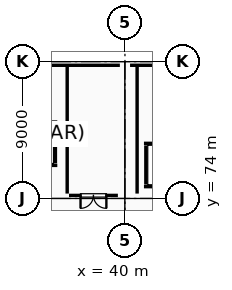
"""IFC4 building model, lengths in metres.
Left out: names, types, materials, properties, quantities, classifications, styles, units other than length and angle.
Written with IfcOpenShell. Run it as: python <this file> out.ifc"""

import sys

from ifc_helpers import new_model, si_unit, direction, frame, frame_2d, origin, origin_2d, place, context, subcontext, project, spatial, rectangle, extrude, element, fill, save


model = new_model("IFC4")
c1 = context("Model", 3, precision=1e-05, world=origin(), true_north=direction((0.0, 1.0)))
c2 = subcontext(c1, "Body", "Model", "MODEL_VIEW")
j1 = project(units=[si_unit("LENGTHUNIT", "METRE"), si_unit("PLANEANGLEUNIT", "RADIAN")], contexts=[c1])
p1 = place(None, origin())
s1 = spatial("IfcSite", under=j1, at=p1, CompositionType="ELEMENT")
p2 = place(p1, origin())
s2 = spatial("IfcBuilding", under=s1, at=p2, CompositionType="ELEMENT")
p3 = place(p2, frame((0.0, 0.0, 15.0)))
s3 = spatial("IfcBuildingStorey", under=s2, at=p3, CompositionType="ELEMENT", Elevation=15.0)
p4 = place(p3, frame((40.0, 74.0, 0.0), z_axis=(0.0, 0.0, 1.0), x_axis=(1.0, 0.0, 0.0)))
e1 = element("IfcColumn", 1, at=p4, inside=s3, PredefinedType="COLUMN", context=c2, shape_type="SweptSolid", body=[
    extrude(rectangle(XDim=0.9, YDim=0.9, at=origin_2d()), origin(), (0.0, 0.0, 1.0), 4.8),
])
p5 = place(p3, frame((40.0, 83.0, 0.0), z_axis=(0.0, 0.0, 1.0), x_axis=(1.0, 0.0, 0.0)))
e2 = element("IfcColumn", 2, at=p5, inside=s3, PredefinedType="COLUMN", context=c2, shape_type="SweptSolid", body=[
    extrude(rectangle(XDim=0.65, YDim=0.65, at=origin_2d()), origin(), (0.0, 0.0, 1.0), 4.8),
])
p6 = place(p3, frame((33.17, 82.76, 0.0), z_axis=(0.0, 0.0, 1.0), x_axis=(1.0, 0.0, 0.0)))
e3 = element("IfcWall", 3, at=p6, inside=s3, PredefinedType="PARAPET", context=c2, shape_type="SweptSolid", body=[
    extrude(rectangle(XDim=6.495, YDim=0.18, at=frame_2d((3.248, 0.0))), origin(), (0.0, 0.0, 1.0), 0.88),
])
p7 = place(p3, frame((40.335, 82.76, 0.0), z_axis=(0.0, 0.0, 1.0), x_axis=(1.0, 0.0, 0.0)))
e4 = element("IfcWall", 4, at=p7, inside=s3, PredefinedType="PARAPET", context=c2, shape_type="SweptSolid", body=[
    extrude(rectangle(XDim=7.33, YDim=0.18, at=frame_2d((3.665, 0.0))), origin(), (0.0, 0.0, 1.0), 0.88),
])
p8 = place(p3, frame((41.25, 74.775, 0.0), z_axis=(0.0, 0.0, 1.0), x_axis=(1.0, 0.0, 0.0)))
e5 = element("IfcWall", 5, at=p8, inside=s3, PredefinedType="STANDARD", context=c2, shape_type="SweptSolid", body=[
    extrude(rectangle(XDim=2.3, YDim=0.25, at=frame_2d((1.15, 0.0))), origin(), (0.0, 0.0, 1.0), 4.54),
])
p9 = place(p8, frame((0.6, 0.0, 0.0)))
e6 = element("IfcOpeningElement", 6, at=p9, cuts=e5, PredefinedType="OPENING", context=c2, shape_type="SweptSolid", body=[
    extrude(rectangle(XDim=1.1, YDim=2.15, at=frame_2d((0.55, 1.075))), frame((0.0, 0.135, 0.0), z_axis=(0.0, -1.0, 0.0), x_axis=(1.0, 0.0, 0.0)), (0.0, 0.0, 1.0), 0.27),
])
p10 = place(p3, frame((43.55, 77.625, 0.0), z_axis=(0.0, 0.0, 1.0), x_axis=(-1.0, 0.0, 0.0)))
e7 = element("IfcWall", 7, at=p10, inside=s3, PredefinedType="STANDARD", context=c2, shape_type="SweptSolid", body=[
    extrude(rectangle(XDim=2.3, YDim=0.25, at=frame_2d((1.15, 0.0))), origin(), (0.0, 0.0, 1.0), 4.54),
])
p11 = place(p3, frame((41.375, 77.49, 0.0), z_axis=(0.0, 0.0, 1.0), x_axis=(0.0, -1.0, 0.0)))
e8 = element("IfcWall", 8, at=p11, inside=s3, PredefinedType="STANDARD", context=c2, shape_type="SweptSolid", body=[
    extrude(rectangle(XDim=2.58, YDim=0.25, at=frame_2d((1.29, 0.0))), origin(), (0.0, 0.0, 1.0), 4.54),
])
p12 = place(p3, frame((33.25, 76.175, 0.0), z_axis=(0.0, 0.0, 1.0), x_axis=(1.0, 0.0, 0.0)))
e9 = element("IfcWall", 9, at=p12, inside=s3, PredefinedType="STANDARD", context=c2, shape_type="SweptSolid", body=[
    extrude(rectangle(XDim=2.3, YDim=0.25, at=frame_2d((1.15, 0.0))), origin(), (0.0, 0.0, 1.0), 4.54),
])
p13 = place(p12, frame((0.6, 0.0, 0.0)))
e10 = element("IfcOpeningElement", 10, at=p13, cuts=e9, PredefinedType="OPENING", context=c2, shape_type="SweptSolid", body=[
    extrude(rectangle(XDim=1.1, YDim=2.15, at=frame_2d((0.55, 1.075))), frame((0.0, 0.135, 0.0), z_axis=(0.0, -1.0, 0.0), x_axis=(1.0, 0.0, 0.0)), (0.0, 0.0, 1.0), 0.27),
])
p14 = place(p3, frame((35.55, 79.025, 0.0), z_axis=(0.0, 0.0, 1.0), x_axis=(-1.0, 0.0, 0.0)))
e11 = element("IfcWall", 11, at=p14, inside=s3, PredefinedType="STANDARD", context=c2, shape_type="SweptSolid", body=[
    extrude(rectangle(XDim=2.3, YDim=0.25, at=frame_2d((1.15, 0.0))), origin(), (0.0, 0.0, 1.0), 4.54),
])
p15 = place(p3, frame((35.425, 76.31, 0.0), z_axis=(0.0, 0.0, 1.0), x_axis=(0.0, 1.0, 0.0)))
e12 = element("IfcWall", 12, at=p15, inside=s3, PredefinedType="STANDARD", context=c2, shape_type="SweptSolid", body=[
    extrude(rectangle(XDim=2.58, YDim=0.25, at=frame_2d((1.29, 0.0))), origin(), (0.0, 0.0, 1.0), 4.54),
])
p16 = place(p3, frame((40.8, 82.666, 0.0), z_axis=(0.0, 0.0, 1.0), x_axis=(0.0, -1.0, 0.0)))
e13 = element("IfcWall", 13, at=p16, inside=s3, PredefinedType="PARTITIONING", context=c2, shape_type="SweptSolid", body=[
    extrude(rectangle(XDim=8.346, YDim=0.2, at=frame_2d((4.173, 0.0))), origin(), (0.0, 0.0, 1.0), 4.54),
])
p17 = place(p3, frame((39.535, 74.2, 0.0), z_axis=(0.0, 0.0, 1.0), x_axis=(-1.0, 0.0, 0.0)))
e14 = element("IfcWall", 14, at=p17, inside=s3, PredefinedType="PARTITIONING", context=c2, shape_type="SweptSolid", body=[
    extrude(rectangle(XDim=3.215, YDim=0.2, at=frame_2d((1.607, 0.0))), origin(), (0.0, 0.0, 1.0), 4.54),
])
p18 = place(p17, frame((0.757, 0.0, 0.0)))
e15 = element("IfcOpeningElement", 15, at=p18, cuts=e14, PredefinedType="OPENING", context=c2, shape_type="SweptSolid", body=[
    extrude(rectangle(XDim=1.7, YDim=2.25, at=frame_2d((0.85, 1.125))), frame((0.0, 0.11, 0.0), z_axis=(0.0, -1.0, 0.0), x_axis=(1.0, 0.0, 0.0)), (0.0, 0.0, 1.0), 0.22),
])
p19 = place(p3, frame((36.2, 74.32, 0.0), z_axis=(0.0, 0.0, 1.0), x_axis=(0.0, 1.0, 0.0)))
e16 = element("IfcWall", 16, at=p19, inside=s3, PredefinedType="PARTITIONING", context=c2, shape_type="SweptSolid", body=[
    extrude(rectangle(XDim=8.346, YDim=0.2, at=frame_2d((4.173, 0.0))), origin(), (0.0, 0.0, 1.0), 4.54),
])
p20 = place(p18, origin())
e17 = element("IfcDoor", 17, at=p20, inside=s3, OperationType="DOUBLE_DOOR_SINGLE_SWING", PredefinedType="DOOR", context=c2, shape_type="SweptSolid", body=[
    extrude(rectangle(XDim=1.7, YDim=2.25, at=frame_2d((0.85, 1.125))), frame((0.0, 0.025, 0.0), z_axis=(0.0, -1.0, 0.0), x_axis=(1.0, 0.0, 0.0)), (0.0, 0.0, 1.0), 0.05),
])
fill(e15, e17)
save(model, sys.argv[1])
